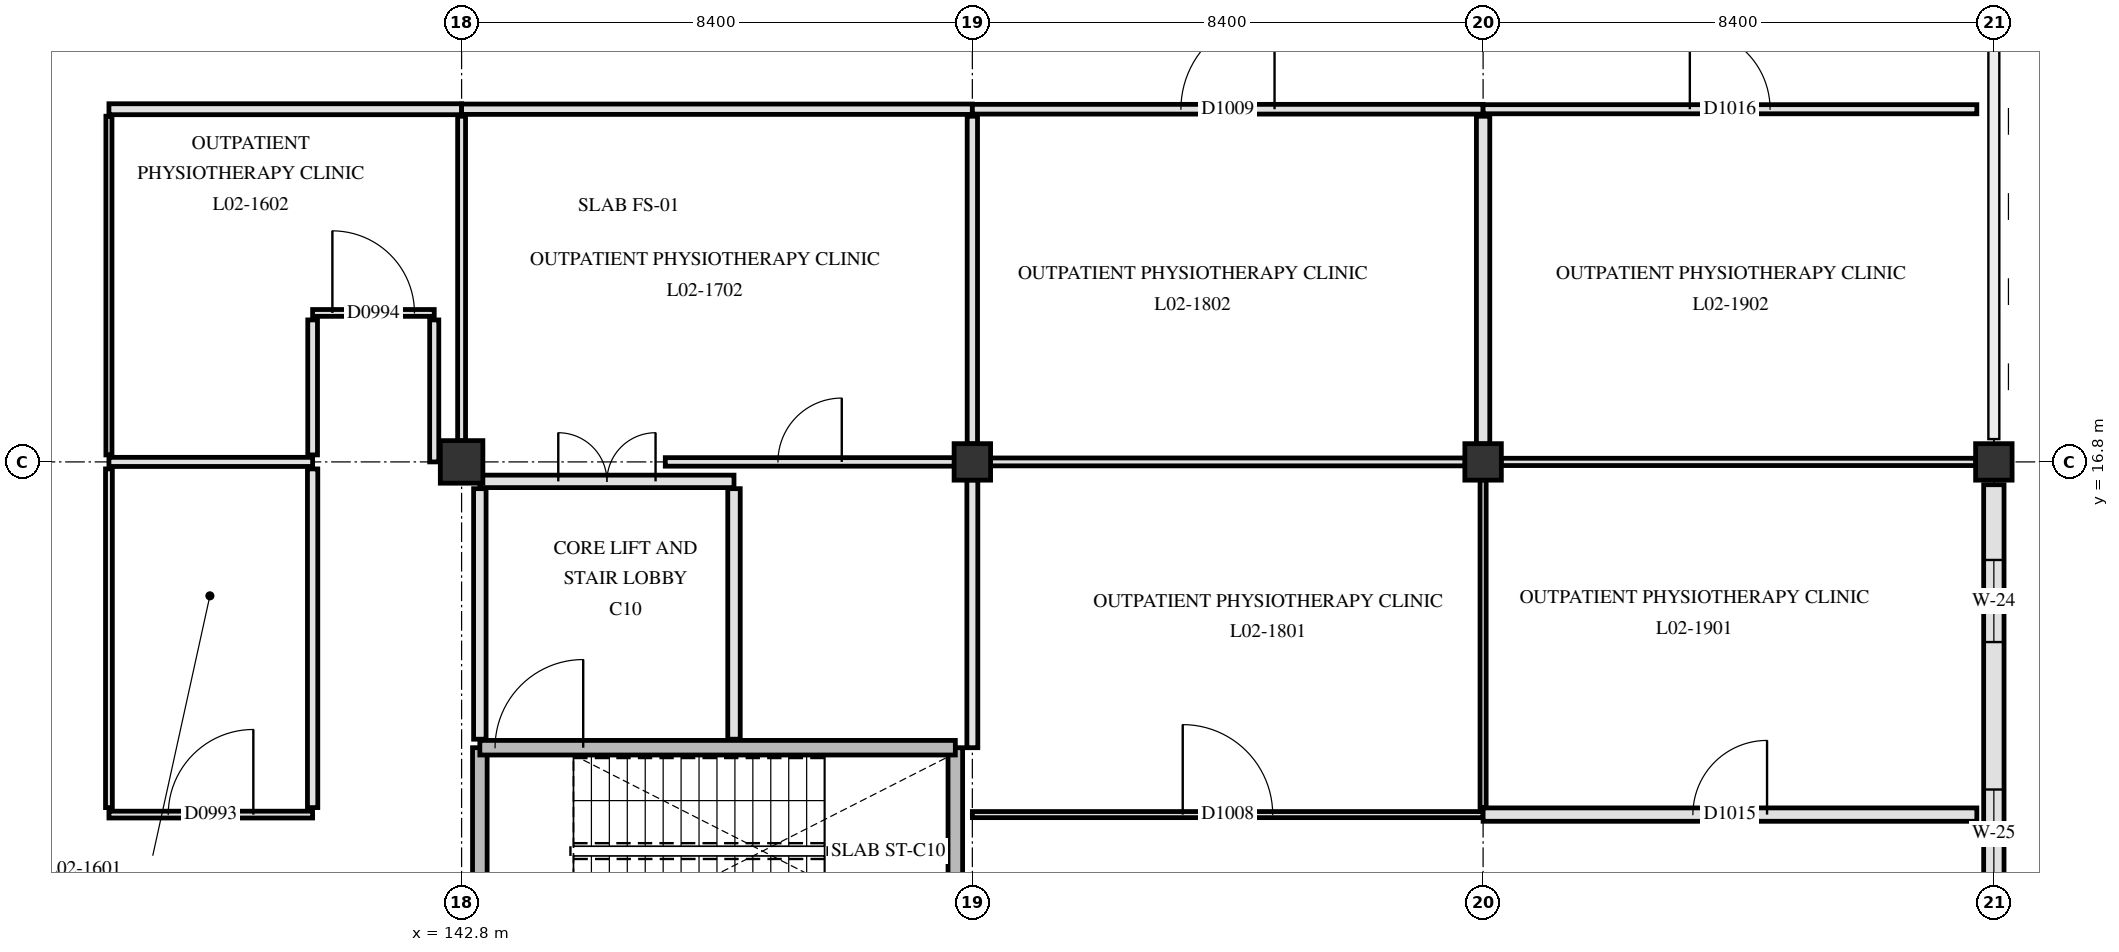
"""IFC4 building model, lengths in metres.
Left out: names, types, materials, properties, quantities, classifications, styles, units other than length and angle.
Written with IfcOpenShell. Run it as: python <this file> out.ifc"""

import sys

from ifc_helpers import new_model, si_unit, direction, frame, frame_2d, origin, origin_2d, place, context, subcontext, project, spatial, rectangle, extrude, element, fill, save


model = new_model("IFC4")
c1 = context("Model", 3, precision=1e-05, world=origin(), true_north=direction((0.0, 1.0)))
c2 = subcontext(c1, "Body", "Model", "MODEL_VIEW")
j1 = project(units=[si_unit("LENGTHUNIT", "METRE"), si_unit("PLANEANGLEUNIT", "RADIAN")], contexts=[c1])
p1 = place(None, origin())
s1 = spatial("IfcSite", under=j1, at=p1, CompositionType="ELEMENT")
p2 = place(p1, origin())
s2 = spatial("IfcBuilding", under=s1, at=p2, CompositionType="ELEMENT")
p3 = place(p2, frame((0.0, 0.0, 9.3)))
s3 = spatial("IfcBuildingStorey", under=s2, at=p3, CompositionType="ELEMENT", Elevation=9.3)
p4 = place(p3, frame((142.8, 16.8, 0.0), z_axis=(0.0, 0.0, 1.0), x_axis=(1.0, 0.0, 0.0)))
e1 = element("IfcColumn", 1, at=p4, inside=s3, PredefinedType="COLUMN", context=c2, shape_type="SweptSolid", body=[
    extrude(rectangle(XDim=0.7, YDim=0.7, at=origin_2d()), origin(), (0.0, 0.0, 1.0), 5.1),
])
for number, where, z_axis, x_axis in (
    (2, (151.2, 16.8, 0.0), (0.0, 0.0, 1.0), (1.0, 0.0, 0.0)),
    (3, (159.6, 16.8, 0.0), (0.0, 0.0, 1.0), (1.0, 0.0, 0.0)),
    (4, (168.0, 16.8, 0.0), (0.0, 0.0, 1.0), (1.0, 0.0, 0.0)),
):
    element("IfcColumn", number, at=place(p3, frame(where, z_axis=z_axis, x_axis=x_axis)), inside=s3, PredefinedType="COLUMN", context=c2, shape_type="SweptSolid", body=[
        extrude(rectangle(XDim=0.6, YDim=0.6, at=origin_2d()), origin(), (0.0, 0.0, 1.0), 5.1),
    ])
p5 = place(p3, frame((168.0, 16.425, 0.0), z_axis=(0.0, 0.0, 1.0), x_axis=(0.0, -1.0, 0.0)))
e5 = element("IfcWall", 5, at=p5, inside=s3, PredefinedType="SOLIDWALL", context=c2, shape_type="SweptSolid", body=[
    extrude(rectangle(XDim=7.65, YDim=0.335, at=frame_2d((3.825, 0.0))), origin(), (0.0, 0.0, 1.0), 4.07),
])
p6 = place(p5, frame((1.238, 0.0, 0.85)))
e6 = element("IfcOpeningElement", 6, at=p6, cuts=e5, PredefinedType="OPENING", context=c2, shape_type="SweptSolid", body=[
    extrude(rectangle(XDim=1.35, YDim=1.54, at=frame_2d((0.675, 0.77))), frame((0.0, 0.177, 0.0), z_axis=(0.0, -1.0, 0.0), x_axis=(1.0, 0.0, 0.0)), (0.0, 0.0, 1.0), 0.355),
])
p7 = place(p5, frame((5.012, 0.0, 0.85)))
e7 = element("IfcOpeningElement", 7, at=p7, cuts=e5, PredefinedType="OPENING", context=c2, shape_type="SweptSolid", body=[
    extrude(rectangle(XDim=1.45, YDim=1.54, at=frame_2d((0.725, 0.77))), frame((0.0, 0.177, 0.0), z_axis=(0.0, -1.0, 0.0), x_axis=(1.0, 0.0, 0.0)), (0.0, 0.0, 1.0), 0.355),
])
for number, where, z_axis, x_axis in (
    (8, (143.1, 8.78, 0.0), (0.0, 0.0, 1.0), (0.0, 1.0, 0.0)),
    (9, (150.92, 8.78, 0.0), (0.0, 0.0, 1.0), (0.0, 1.0, 0.0)),
):
    element("IfcWall", number, at=place(p3, frame(where, z_axis=z_axis, x_axis=x_axis)), inside=s3, PredefinedType="SHEAR", context=c2, shape_type="SweptSolid", body=[
        extrude(rectangle(XDim=3.32, YDim=0.24, at=frame_2d((1.66, 0.0))), origin(), (0.0, 0.0, 1.0), 4.78),
    ])
p8 = place(p3, frame((143.1, 12.1, 0.0), z_axis=(0.0, 0.0, 1.0), x_axis=(1.0, 0.0, 0.0)))
e10 = element("IfcWall", 10, at=p8, inside=s3, PredefinedType="SHEAR", context=c2, shape_type="SweptSolid", body=[
    extrude(rectangle(XDim=7.82, YDim=0.24, at=frame_2d((3.91, 0.0))), origin(), (0.0, 0.0, 1.0), 4.78),
])
p9 = place(p8, frame((0.25, 0.0, 0.0)))
e11 = element("IfcOpeningElement", 11, at=p9, cuts=e10, PredefinedType="OPENING", context=c2, shape_type="SweptSolid", body=[
    extrude(rectangle(XDim=1.45, YDim=2.2, at=frame_2d((0.725, 1.1))), frame((0.0, 0.13, 0.0), z_axis=(0.0, -1.0, 0.0), x_axis=(1.0, 0.0, 0.0)), (0.0, 0.0, 1.0), 0.26),
])
p10 = place(p3, frame((147.28, 12.24, 0.0), z_axis=(0.0, 0.0, 1.0), x_axis=(0.0, 1.0, 0.0)))
e12 = element("IfcWall", 12, at=p10, inside=s3, PredefinedType="PARTITIONING", context=c2, shape_type="SweptSolid", body=[
    extrude(rectangle(XDim=4.12, YDim=0.205, at=frame_2d((2.06, 0.0))), origin(), (0.0, 0.0, 1.0), 4.77),
])
p11 = place(p3, frame((143.1, 12.24, 0.0), z_axis=(0.0, 0.0, 1.0), x_axis=(0.0, 1.0, 0.0)))
e13 = element("IfcWall", 13, at=p11, inside=s3, PredefinedType="PARTITIONING", context=c2, shape_type="SweptSolid", body=[
    extrude(rectangle(XDim=4.12, YDim=0.205, at=frame_2d((2.06, 0.0))), origin(), (0.0, 0.0, 1.0), 4.17),
])
p12 = place(p3, frame((143.1, 16.48, 0.0), z_axis=(0.0, 0.0, 1.0), x_axis=(1.0, 0.0, 0.0)))
e14 = element("IfcWall", 14, at=p12, inside=s3, PredefinedType="PARTITIONING", context=c2, shape_type="SweptSolid", body=[
    extrude(rectangle(XDim=4.18, YDim=0.205, at=frame_2d((2.09, 0.0))), origin(), (0.0, 0.0, 1.0), 4.17),
])
p13 = place(p12, frame((1.29, 0.0, 0.0)))
e15 = element("IfcOpeningElement", 15, at=p13, cuts=e14, PredefinedType="OPENING", context=c2, shape_type="SweptSolid", body=[
    extrude(rectangle(XDim=1.6, YDim=2.25, at=frame_2d((0.8, 1.125))), frame((0.0, 0.113, 0.0), z_axis=(0.0, -1.0, 0.0), x_axis=(1.0, 0.0, 0.0)), (0.0, 0.0, 1.0), 0.225),
])
p14 = place(p3, frame((137.0, 11.0, 0.0), z_axis=(0.0, 0.0, 1.0), x_axis=(1.0, 0.0, 0.0)))
e16 = element("IfcWall", 16, at=p14, inside=s3, PredefinedType="PARTITIONING", context=c2, shape_type="SweptSolid", body=[
    extrude(rectangle(XDim=3.35, YDim=0.112, at=frame_2d((1.675, 0.0))), origin(), (0.0, 0.0, 1.0), 4.77),
])
p15 = place(p14, frame((0.975, 0.0, 0.0)))
e17 = element("IfcOpeningElement", 17, at=p15, cuts=e16, PredefinedType="OPENING", context=c2, shape_type="SweptSolid", body=[
    extrude(rectangle(XDim=1.4, YDim=2.2, at=frame_2d((0.7, 1.1))), frame((0.0, 0.066, 0.0), z_axis=(0.0, -1.0, 0.0), x_axis=(1.0, 0.0, 0.0)), (0.0, 0.0, 1.0), 0.132),
])
p16 = place(p3, frame((151.2, 11.0, 0.0), z_axis=(0.0, 0.0, 1.0), x_axis=(1.0, 0.0, 0.0)))
e18 = element("IfcWall", 18, at=p16, inside=s3, PredefinedType="PARTITIONING", context=c2, shape_type="SweptSolid", body=[
    extrude(rectangle(XDim=8.4, YDim=0.1, at=frame_2d((4.2, 0.0))), origin(), (0.0, 0.0, 1.0), 4.17),
])
p17 = place(p16, frame((3.46, 0.0, 0.0)))
e19 = element("IfcOpeningElement", 19, at=p17, cuts=e18, PredefinedType="OPENING", context=c2, shape_type="SweptSolid", body=[
    extrude(rectangle(XDim=1.48, YDim=2.22, at=frame_2d((0.74, 1.11))), frame((0.0, 0.06, 0.0), z_axis=(0.0, -1.0, 0.0), x_axis=(1.0, 0.0, 0.0)), (0.0, 0.0, 1.0), 0.12),
])
p18 = place(p3, frame((159.6, 11.0, 0.0), z_axis=(0.0, 0.0, 1.0), x_axis=(1.0, 0.0, 0.0)))
e20 = element("IfcWall", 20, at=p18, inside=s3, PredefinedType="PARTITIONING", context=c2, shape_type="SweptSolid", body=[
    extrude(rectangle(XDim=8.12, YDim=0.22, at=frame_2d((4.06, 0.0))), origin(), (0.0, 0.0, 1.0), 4.17),
])
p19 = place(p18, frame((3.45, 0.0, 0.0)))
e21 = element("IfcOpeningElement", 21, at=p19, cuts=e20, PredefinedType="OPENING", context=c2, shape_type="SweptSolid", body=[
    extrude(rectangle(XDim=1.22, YDim=2.18, at=frame_2d((0.61, 1.09))), frame((0.0, 0.12, 0.0), z_axis=(0.0, -1.0, 0.0), x_axis=(1.0, 0.0, 0.0)), (0.0, 0.0, 1.0), 0.24),
])
p20 = place(p3, frame((137.0, 16.8, 0.0), z_axis=(0.0, 0.0, 1.0), x_axis=(1.0, 0.0, 0.0)))
e22 = element("IfcWall", 22, at=p20, inside=s3, PredefinedType="PARTITIONING", context=c2, shape_type="SweptSolid", body=[
    extrude(rectangle(XDim=3.35, YDim=0.15, at=frame_2d((1.675, 0.0))), origin(), (0.0, 0.0, 1.0), 4.17),
])
p21 = place(p3, frame((146.15, 16.8, 0.0), z_axis=(0.0, 0.0, 1.0), x_axis=(1.0, 0.0, 0.0)))
e23 = element("IfcWall", 23, at=p21, inside=s3, PredefinedType="PARTITIONING", context=c2, shape_type="SweptSolid", body=[
    extrude(rectangle(XDim=4.755, YDim=0.14, at=frame_2d((2.377, 0.0))), origin(), (0.0, 0.0, 1.0), 4.17),
])
p22 = place(p21, frame((1.853, 0.0, 0.0)))
e24 = element("IfcOpeningElement", 24, at=p22, cuts=e23, PredefinedType="OPENING", context=c2, shape_type="SweptSolid", body=[
    extrude(rectangle(XDim=1.05, YDim=2.15, at=frame_2d((0.525, 1.075))), frame((0.0, 0.08, 0.0), z_axis=(0.0, -1.0, 0.0), x_axis=(1.0, 0.0, 0.0)), (0.0, 0.0, 1.0), 0.16),
])
p23 = place(p3, frame((151.495, 16.8, 0.0), z_axis=(0.0, 0.0, 1.0), x_axis=(1.0, 0.0, 0.0)))
e25 = element("IfcWall", 25, at=p23, inside=s3, PredefinedType="PARTITIONING", context=c2, shape_type="SweptSolid", body=[
    extrude(rectangle(XDim=7.81, YDim=0.13, at=frame_2d((3.905, 0.0))), origin(), (0.0, 0.0, 1.0), 4.17),
])
p24 = place(p3, frame((159.895, 16.8, 0.0), z_axis=(0.0, 0.0, 1.0), x_axis=(1.0, 0.0, 0.0)))
e26 = element("IfcWall", 26, at=p24, inside=s3, PredefinedType="PARTITIONING", context=c2, shape_type="SweptSolid", body=[
    extrude(rectangle(XDim=7.81, YDim=0.12, at=frame_2d((3.905, 0.0))), origin(), (0.0, 0.0, 1.0), 4.17),
])
p25 = place(p3, frame((140.35, 19.25, 0.0), z_axis=(0.0, 0.0, 1.0), x_axis=(1.0, 0.0, 0.0)))
e27 = element("IfcWall", 27, at=p25, inside=s3, PredefinedType="PARTITIONING", context=c2, shape_type="SweptSolid", body=[
    extrude(rectangle(XDim=2.0, YDim=0.112, at=frame_2d((1.0, 0.0))), origin(), (0.0, 0.0, 1.0), 4.77),
])
p26 = place(p25, frame((0.325, 0.0, 0.0)))
e28 = element("IfcOpeningElement", 28, at=p26, cuts=e27, PredefinedType="OPENING", context=c2, shape_type="SweptSolid", body=[
    extrude(rectangle(XDim=1.35, YDim=2.2, at=frame_2d((0.675, 1.1))), frame((0.0, 0.066, 0.0), z_axis=(0.0, -1.0, 0.0), x_axis=(1.0, 0.0, 0.0)), (0.0, 0.0, 1.0), 0.132),
])
p27 = place(p3, frame((137.0, 22.6, 0.0), z_axis=(0.0, 0.0, 1.0), x_axis=(1.0, 0.0, 0.0)))
e29 = element("IfcWall", 29, at=p27, inside=s3, PredefinedType="PARTITIONING", context=c2, shape_type="SweptSolid", body=[
    extrude(rectangle(XDim=5.8, YDim=0.18, at=frame_2d((2.9, 0.0))), origin(), (0.0, 0.0, 1.0), 4.17),
])
p28 = place(p3, frame((142.8, 22.6, 0.0), z_axis=(0.0, 0.0, 1.0), x_axis=(1.0, 0.0, 0.0)))
e30 = element("IfcWall", 30, at=p28, inside=s3, PredefinedType="PARTITIONING", context=c2, shape_type="SweptSolid", body=[
    extrude(rectangle(XDim=8.4, YDim=0.17, at=frame_2d((4.2, 0.0))), origin(), (0.0, 0.0, 1.0), 4.17),
])
p29 = place(p3, frame((151.2, 22.6, 0.0), z_axis=(0.0, 0.0, 1.0), x_axis=(1.0, 0.0, 0.0)))
e31 = element("IfcWall", 31, at=p29, inside=s3, PredefinedType="PARTITIONING", context=c2, shape_type="SweptSolid", body=[
    extrude(rectangle(XDim=8.4, YDim=0.16, at=frame_2d((4.2, 0.0))), origin(), (0.0, 0.0, 1.0), 4.17),
])
p30 = place(p29, frame((3.43, 0.0, 0.0)))
e32 = element("IfcOpeningElement", 32, at=p30, cuts=e31, PredefinedType="OPENING", context=c2, shape_type="SweptSolid", body=[
    extrude(rectangle(XDim=1.54, YDim=2.24, at=frame_2d((0.77, 1.12))), frame((0.0, 0.09, 0.0), z_axis=(0.0, -1.0, 0.0), x_axis=(1.0, 0.0, 0.0)), (0.0, 0.0, 1.0), 0.18),
])
p31 = place(p3, frame((159.6, 22.6, 0.0), z_axis=(0.0, 0.0, 1.0), x_axis=(1.0, 0.0, 0.0)))
e33 = element("IfcWall", 33, at=p31, inside=s3, PredefinedType="PARTITIONING", context=c2, shape_type="SweptSolid", body=[
    extrude(rectangle(XDim=8.12, YDim=0.15, at=frame_2d((4.06, 0.0))), origin(), (0.0, 0.0, 1.0), 4.17),
])
p32 = place(p31, frame((3.4, 0.0, 0.0)))
e34 = element("IfcOpeningElement", 34, at=p32, cuts=e33, PredefinedType="OPENING", context=c2, shape_type="SweptSolid", body=[
    extrude(rectangle(XDim=1.32, YDim=2.18, at=frame_2d((0.66, 1.09))), frame((0.0, 0.085, 0.0), z_axis=(0.0, -1.0, 0.0), x_axis=(1.0, 0.0, 0.0)), (0.0, 0.0, 1.0), 0.17),
])
p33 = place(p3, frame((137.0, 11.115, 0.0), z_axis=(0.0, 0.0, 1.0), x_axis=(0.0, 1.0, 0.0)))
e35 = element("IfcWall", 35, at=p33, inside=s3, PredefinedType="PARTITIONING", context=c2, shape_type="SweptSolid", body=[
    extrude(rectangle(XDim=5.57, YDim=0.112, at=frame_2d((2.785, 0.0))), origin(), (0.0, 0.0, 1.0), 4.17),
])
p34 = place(p3, frame((137.0, 16.915, 0.0), z_axis=(0.0, 0.0, 1.0), x_axis=(0.0, 1.0, 0.0)))
e36 = element("IfcWall", 36, at=p34, inside=s3, PredefinedType="PARTITIONING", context=c2, shape_type="SweptSolid", body=[
    extrude(rectangle(XDim=5.57, YDim=0.1, at=frame_2d((2.785, 0.0))), origin(), (0.0, 0.0, 1.0), 4.17),
])
p35 = place(p3, frame((140.35, 11.115, 0.0), z_axis=(0.0, 0.0, 1.0), x_axis=(0.0, 1.0, 0.0)))
e37 = element("IfcWall", 37, at=p35, inside=s3, PredefinedType="PARTITIONING", context=c2, shape_type="SweptSolid", body=[
    extrude(rectangle(XDim=5.57, YDim=0.17, at=frame_2d((2.785, 0.0))), origin(), (0.0, 0.0, 1.0), 4.17),
])
p36 = place(p3, frame((140.35, 16.915, 0.0), z_axis=(0.0, 0.0, 1.0), x_axis=(0.0, 1.0, 0.0)))
e38 = element("IfcWall", 38, at=p36, inside=s3, PredefinedType="PARTITIONING", context=c2, shape_type="SweptSolid", body=[
    extrude(rectangle(XDim=2.22, YDim=0.16, at=frame_2d((1.11, 0.0))), origin(), (0.0, 0.0, 1.0), 4.17),
])
p37 = place(p3, frame((142.35, 16.8, 0.0), z_axis=(0.0, 0.0, 1.0), x_axis=(0.0, 1.0, 0.0)))
e39 = element("IfcWall", 39, at=p37, inside=s3, PredefinedType="PARTITIONING", context=c2, shape_type="SweptSolid", body=[
    extrude(rectangle(XDim=2.335, YDim=0.15, at=frame_2d((1.167, 0.0))), origin(), (0.0, 0.0, 1.0), 4.17),
])
p38 = place(p3, frame((142.8, 17.145, 0.0), z_axis=(0.0, 0.0, 1.0), x_axis=(0.0, 1.0, 0.0)))
e40 = element("IfcWall", 40, at=p38, inside=s3, PredefinedType="PARTITIONING", context=c2, shape_type="SweptSolid", body=[
    extrude(rectangle(XDim=5.34, YDim=0.13, at=frame_2d((2.67, 0.0))), origin(), (0.0, 0.0, 1.0), 4.17),
])
p39 = place(p3, frame((151.2, 12.1, 0.0), z_axis=(0.0, 0.0, 1.0), x_axis=(0.0, 1.0, 0.0)))
e41 = element("IfcWall", 41, at=p39, inside=s3, PredefinedType="PARTITIONING", context=c2, shape_type="SweptSolid", body=[
    extrude(rectangle(XDim=4.405, YDim=0.18, at=frame_2d((2.202, 0.0))), origin(), (0.0, 0.0, 1.0), 4.17),
])
p40 = place(p3, frame((151.2, 17.095, 0.0), z_axis=(0.0, 0.0, 1.0), x_axis=(0.0, 1.0, 0.0)))
e42 = element("IfcWall", 42, at=p40, inside=s3, PredefinedType="PARTITIONING", context=c2, shape_type="SweptSolid", body=[
    extrude(rectangle(XDim=5.39, YDim=0.17, at=frame_2d((2.695, 0.0))), origin(), (0.0, 0.0, 1.0), 4.17),
])
p41 = place(p3, frame((159.6, 11.115, 0.0), z_axis=(0.0, 0.0, 1.0), x_axis=(0.0, 1.0, 0.0)))
e43 = element("IfcWall", 43, at=p41, inside=s3, PredefinedType="PARTITIONING", context=c2, shape_type="SweptSolid", body=[
    extrude(rectangle(XDim=5.39, YDim=0.1, at=frame_2d((2.695, 0.0))), origin(), (0.0, 0.0, 1.0), 4.17),
])
p42 = place(p3, frame((159.6, 17.095, 0.0), z_axis=(0.0, 0.0, 1.0), x_axis=(0.0, 1.0, 0.0)))
e44 = element("IfcWall", 44, at=p42, inside=s3, PredefinedType="PARTITIONING", context=c2, shape_type="SweptSolid", body=[
    extrude(rectangle(XDim=5.39, YDim=0.22, at=frame_2d((2.695, 0.0))), origin(), (0.0, 0.0, 1.0), 4.17),
])
p43 = place(p6, origin())
e45 = element("IfcWindow", 45, at=p43, inside=s3, PartitioningType="SINGLE_PANEL", PredefinedType="WINDOW", context=c2, shape_type="SweptSolid", body=[
    extrude(rectangle(XDim=1.35, YDim=1.54, at=frame_2d((0.675, 0.77))), frame((0.0, 0.03, 0.0), z_axis=(0.0, -1.0, 0.0), x_axis=(1.0, 0.0, 0.0)), (0.0, 0.0, 1.0), 0.06),
])
fill(e6, e45)
p44 = place(p7, origin())
e46 = element("IfcWindow", 46, at=p44, inside=s3, PartitioningType="SINGLE_PANEL", PredefinedType="WINDOW", context=c2, shape_type="SweptSolid", body=[
    extrude(rectangle(XDim=1.45, YDim=1.54, at=frame_2d((0.725, 0.77))), frame((0.0, 0.03, 0.0), z_axis=(0.0, -1.0, 0.0), x_axis=(1.0, 0.0, 0.0)), (0.0, 0.0, 1.0), 0.06),
])
fill(e7, e46)
p45 = place(p9, origin())
e47 = element("IfcDoor", 47, at=p45, inside=s3, OperationType="SINGLE_SWING_RIGHT", PredefinedType="DOOR", context=c2, shape_type="SweptSolid", body=[
    extrude(rectangle(XDim=1.45, YDim=2.2, at=frame_2d((0.725, 1.1))), frame((0.0, 0.025, 0.0), z_axis=(0.0, -1.0, 0.0), x_axis=(1.0, 0.0, 0.0)), (0.0, 0.0, 1.0), 0.05),
])
fill(e11, e47)
p46 = place(p13, origin())
e48 = element("IfcDoor", 48, at=p46, inside=s3, OperationType="DOUBLE_SWING_LEFT", PredefinedType="DOOR", context=c2, shape_type="SweptSolid", body=[
    extrude(rectangle(XDim=1.6, YDim=2.25, at=frame_2d((0.8, 1.125))), frame((0.0, 0.025, 0.0), z_axis=(0.0, -1.0, 0.0), x_axis=(1.0, 0.0, 0.0)), (0.0, 0.0, 1.0), 0.05),
])
fill(e15, e48)
p47 = place(p15, origin())
e49 = element("IfcDoor", 49, at=p47, inside=s3, OperationType="SINGLE_SWING_RIGHT", PredefinedType="DOOR", context=c2, shape_type="SweptSolid", body=[
    extrude(rectangle(XDim=1.4, YDim=2.2, at=frame_2d((0.7, 1.1))), frame((0.0, 0.025, 0.0), z_axis=(0.0, -1.0, 0.0), x_axis=(1.0, 0.0, 0.0)), (0.0, 0.0, 1.0), 0.05),
])
fill(e17, e49)
p48 = place(p26, origin())
e50 = element("IfcDoor", 50, at=p48, inside=s3, OperationType="SINGLE_SWING_LEFT", PredefinedType="DOOR", context=c2, shape_type="SweptSolid", body=[
    extrude(rectangle(XDim=1.35, YDim=2.2, at=frame_2d((0.675, 1.1))), frame((0.0, 0.025, 0.0), z_axis=(0.0, -1.0, 0.0), x_axis=(1.0, 0.0, 0.0)), (0.0, 0.0, 1.0), 0.05),
])
fill(e28, e50)
p49 = place(p22, origin())
e51 = element("IfcDoor", 51, at=p49, inside=s3, OperationType="SINGLE_SWING_RIGHT", PredefinedType="DOOR", context=c2, shape_type="SweptSolid", body=[
    extrude(rectangle(XDim=1.05, YDim=2.15, at=frame_2d((0.525, 1.075))), frame((0.0, 0.025, 0.0), z_axis=(0.0, -1.0, 0.0), x_axis=(1.0, 0.0, 0.0)), (0.0, 0.0, 1.0), 0.05),
])
fill(e24, e51)
p50 = place(p17, origin())
e52 = element("IfcDoor", 52, at=p50, inside=s3, OperationType="SINGLE_SWING_LEFT", PredefinedType="DOOR", context=c2, shape_type="SweptSolid", body=[
    extrude(rectangle(XDim=1.48, YDim=2.22, at=frame_2d((0.74, 1.11))), frame((0.0, 0.025, 0.0), z_axis=(0.0, -1.0, 0.0), x_axis=(1.0, 0.0, 0.0)), (0.0, 0.0, 1.0), 0.05),
])
fill(e19, e52)
p51 = place(p30, origin())
e53 = element("IfcDoor", 53, at=p51, inside=s3, OperationType="SINGLE_SWING_RIGHT", PredefinedType="DOOR", context=c2, shape_type="SweptSolid", body=[
    extrude(rectangle(XDim=1.54, YDim=2.24, at=frame_2d((0.77, 1.12))), frame((0.0, 0.025, 0.0), z_axis=(0.0, -1.0, 0.0), x_axis=(1.0, 0.0, 0.0)), (0.0, 0.0, 1.0), 0.05),
])
fill(e32, e53)
p52 = place(p19, origin())
e54 = element("IfcDoor", 54, at=p52, inside=s3, OperationType="SINGLE_SWING_RIGHT", PredefinedType="DOOR", context=c2, shape_type="SweptSolid", body=[
    extrude(rectangle(XDim=1.22, YDim=2.18, at=frame_2d((0.61, 1.09))), frame((0.0, 0.025, 0.0), z_axis=(0.0, -1.0, 0.0), x_axis=(1.0, 0.0, 0.0)), (0.0, 0.0, 1.0), 0.05),
])
fill(e21, e54)
p53 = place(p32, origin())
e55 = element("IfcDoor", 55, at=p53, inside=s3, OperationType="SINGLE_SWING_LEFT", PredefinedType="DOOR", context=c2, shape_type="SweptSolid", body=[
    extrude(rectangle(XDim=1.32, YDim=2.18, at=frame_2d((0.66, 1.09))), frame((0.0, 0.025, 0.0), z_axis=(0.0, -1.0, 0.0), x_axis=(1.0, 0.0, 0.0)), (0.0, 0.0, 1.0), 0.05),
])
fill(e34, e55)
save(model, sys.argv[1])
